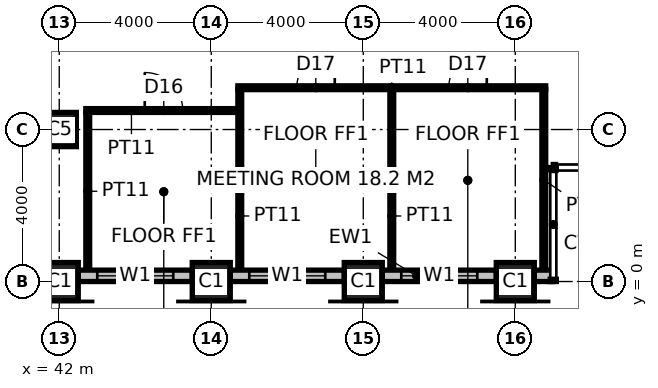
"""IFC4 building model, lengths in metres.
Left out: names, types, materials, properties, quantities, classifications, styles, units other than length and angle.
Written with IfcOpenShell. Run it as: python <this file> out.ifc"""

import sys

from ifc_helpers import new_model, si_unit, direction, frame, frame_2d, origin, origin_2d, place, context, subcontext, project, spatial, rectangle, hollow_rectangle, extrude, element, fill, save


model = new_model("IFC4")
c1 = context("Model", 3, precision=1e-05, world=origin(), true_north=direction((0.0, 1.0)))
c2 = subcontext(c1, "Body", "Model", "MODEL_VIEW")
j1 = project(units=[si_unit("LENGTHUNIT", "METRE"), si_unit("PLANEANGLEUNIT", "RADIAN")], contexts=[c1])
p1 = place(None, origin())
s1 = spatial("IfcSite", under=j1, at=p1, CompositionType="ELEMENT")
p2 = place(p1, origin())
s2 = spatial("IfcBuilding", under=s1, at=p2, CompositionType="ELEMENT")
p3 = place(p2, frame((0.0, 0.0, 93.4)))
s3 = spatial("IfcBuildingStorey", under=s2, at=p3, CompositionType="ELEMENT", Elevation=93.4)
for number, where, z_axis, x_axis in (
    (1, (42.0, 0.0, 0.0), (0.0, 0.0, 1.0), (1.0, 0.0, 0.0)),
    (2, (46.0, 0.0, 0.0), (0.0, 0.0, 1.0), (1.0, 0.0, 0.0)),
    (3, (50.0, 0.0, 0.0), (0.0, 0.0, 1.0), (1.0, 0.0, 0.0)),
    (4, (54.0, 0.0, 0.0), (0.0, 0.0, 1.0), (1.0, 0.0, 0.0)),
):
    element("IfcColumn", number, at=place(p3, frame(where, z_axis=z_axis, x_axis=x_axis)), inside=s3, PredefinedType="COLUMN", context=c2, shape_type="SweptSolid", body=[
        extrude(hollow_rectangle(XDim=1.0, YDim=1.0, WallThickness=0.1, at=origin_2d()), origin(), (0.0, 0.0, 1.0), 4.0),
    ])
p4 = place(p3, frame((42.0, 4.0, 0.0), z_axis=(0.0, 0.0, 1.0), x_axis=(1.0, 0.0, 0.0)))
e5 = element("IfcColumn", 5, at=p4, inside=s3, PredefinedType="COLUMN", context=c2, shape_type="SweptSolid", body=[
    extrude(hollow_rectangle(XDim=0.9, YDim=0.9, WallThickness=0.1, at=origin_2d()), origin(), (0.0, 0.0, 1.0), 4.0),
])
p5 = place(p3, frame((42.7, 4.5, 0.0), z_axis=(0.0, 0.0, 1.0), x_axis=(1.0, 0.0, 0.0)))
e6 = element("IfcWall", 6, at=p5, inside=s3, PredefinedType="PARTITIONING", context=c2, shape_type="SweptSolid", body=[
    extrude(rectangle(XDim=4.0, YDim=0.1, at=frame_2d((2.0, 0.0))), origin(), (0.0, 0.0, 1.0), 3.85),
])
p6 = place(p5, frame((1.55, 0.0, 0.0)))
e7 = element("IfcOpeningElement", 7, at=p6, cuts=e6, PredefinedType="OPENING", context=c2, shape_type="SweptSolid", body=[
    extrude(rectangle(XDim=1.0, YDim=2.2, at=frame_2d((0.5, 1.1))), frame((0.0, 0.06, 0.0), z_axis=(0.0, -1.0, 0.0), x_axis=(1.0, 0.0, 0.0)), (0.0, 0.0, 1.0), 0.12),
])
p7 = place(p3, frame((46.7, 5.1, 0.0), z_axis=(0.0, 0.0, 1.0), x_axis=(1.0, 0.0, 0.0)))
e8 = element("IfcWall", 8, at=p7, inside=s3, PredefinedType="PARTITIONING", context=c2, shape_type="SweptSolid", body=[
    extrude(rectangle(XDim=8.1, YDim=0.1, at=frame_2d((4.05, 0.0))), origin(), (0.0, 0.0, 1.0), 3.85),
])
p8 = place(p7, frame((1.55, 0.0, 0.0)))
e9 = element("IfcOpeningElement", 9, at=p8, cuts=e8, PredefinedType="OPENING", context=c2, shape_type="SweptSolid", body=[
    extrude(rectangle(XDim=1.0, YDim=2.2, at=frame_2d((0.5, 1.1))), frame((0.0, 0.06, 0.0), z_axis=(0.0, -1.0, 0.0), x_axis=(1.0, 0.0, 0.0)), (0.0, 0.0, 1.0), 0.12),
])
p9 = place(p7, frame((5.55, 0.0, 0.0)))
e10 = element("IfcOpeningElement", 10, at=p9, cuts=e8, PredefinedType="OPENING", context=c2, shape_type="SweptSolid", body=[
    extrude(rectangle(XDim=1.0, YDim=2.2, at=frame_2d((0.5, 1.1))), frame((0.0, 0.06, 0.0), z_axis=(0.0, -1.0, 0.0), x_axis=(1.0, 0.0, 0.0)), (0.0, 0.0, 1.0), 0.12),
])
p10 = place(p3, frame((42.75, 0.3, 0.0), z_axis=(0.0, 0.0, 1.0), x_axis=(0.0, 1.0, 0.0)))
e11 = element("IfcWall", 11, at=p10, inside=s3, PredefinedType="PARTITIONING", context=c2, shape_type="SweptSolid", body=[
    extrude(rectangle(XDim=4.15, YDim=0.1, at=frame_2d((2.075, 0.0))), origin(), (0.0, 0.0, 1.0), 3.85),
])
for number, where, z_axis, x_axis in (
    (12, (46.75, 0.3, 0.0), (0.0, 0.0, 1.0), (0.0, 1.0, 0.0)),
    (13, (50.75, 0.3, 0.0), (0.0, 0.0, 1.0), (0.0, 1.0, 0.0)),
    (14, (54.75, 0.3, 0.0), (0.0, 0.0, 1.0), (0.0, 1.0, 0.0)),
):
    element("IfcWall", number, at=place(p3, frame(where, z_axis=z_axis, x_axis=x_axis)), inside=s3, PredefinedType="PARTITIONING", context=c2, shape_type="SweptSolid", body=[
        extrude(rectangle(XDim=4.75, YDim=0.1, at=frame_2d((2.375, 0.0))), origin(), (0.0, 0.0, 1.0), 3.85),
    ])
p11 = place(p3, frame((42.5, 0.15, 0.0), z_axis=(0.0, 0.0, 1.0), x_axis=(1.0, 0.0, 0.0)))
e15 = element("IfcWall", 15, at=p11, inside=s3, PredefinedType="ELEMENTEDWALL", context=c2, shape_type="SweptSolid", body=[
    extrude(rectangle(XDim=3.0, YDim=0.3, at=frame_2d((1.5, 0.0))), origin(), (0.0, 0.0, 1.0), 2.85),
])
p12 = place(p11, frame((0.5, 0.0, 0.8)))
e16 = element("IfcOpeningElement", 16, at=p12, cuts=e15, PredefinedType="OPENING", context=c2, shape_type="SweptSolid", body=[
    extrude(rectangle(XDim=2.0, YDim=2.0, at=frame_2d((1.0, 1.0))), frame((0.0, 0.16, 0.0), z_axis=(0.0, -1.0, 0.0), x_axis=(1.0, 0.0, 0.0)), (0.0, 0.0, 1.0), 0.32),
])
p13 = place(p3, frame((46.5, 0.15, 0.0), z_axis=(0.0, 0.0, 1.0), x_axis=(1.0, 0.0, 0.0)))
e17 = element("IfcWall", 17, at=p13, inside=s3, PredefinedType="ELEMENTEDWALL", context=c2, shape_type="SweptSolid", body=[
    extrude(rectangle(XDim=3.0, YDim=0.3, at=frame_2d((1.5, 0.0))), origin(), (0.0, 0.0, 1.0), 2.85),
])
p14 = place(p13, frame((0.5, 0.0, 0.8)))
e18 = element("IfcOpeningElement", 18, at=p14, cuts=e17, PredefinedType="OPENING", context=c2, shape_type="SweptSolid", body=[
    extrude(rectangle(XDim=2.0, YDim=2.0, at=frame_2d((1.0, 1.0))), frame((0.0, 0.16, 0.0), z_axis=(0.0, -1.0, 0.0), x_axis=(1.0, 0.0, 0.0)), (0.0, 0.0, 1.0), 0.32),
])
p15 = place(p3, frame((50.5, 0.15, 0.0), z_axis=(0.0, 0.0, 1.0), x_axis=(1.0, 0.0, 0.0)))
e19 = element("IfcWall", 19, at=p15, inside=s3, PredefinedType="ELEMENTEDWALL", context=c2, shape_type="SweptSolid", body=[
    extrude(rectangle(XDim=3.0, YDim=0.3, at=frame_2d((1.5, 0.0))), origin(), (0.0, 0.0, 1.0), 2.85),
])
p16 = place(p15, frame((0.5, 0.0, 0.8)))
e20 = element("IfcOpeningElement", 20, at=p16, cuts=e19, PredefinedType="OPENING", context=c2, shape_type="SweptSolid", body=[
    extrude(rectangle(XDim=2.0, YDim=2.0, at=frame_2d((1.0, 1.0))), frame((0.0, 0.16, 0.0), z_axis=(0.0, -1.0, 0.0), x_axis=(1.0, 0.0, 0.0)), (0.0, 0.0, 1.0), 0.32),
])
p17 = place(p3, frame((54.5, 0.15, 0.0), z_axis=(0.0, 0.0, 1.0), x_axis=(1.0, 0.0, 0.0)))
e21 = element("IfcWall", 21, at=p17, inside=s3, PredefinedType="ELEMENTEDWALL", context=c2, shape_type="SweptSolid", body=[
    extrude(rectangle(XDim=0.47, YDim=0.3, at=frame_2d((0.235, 0.0))), origin(), (0.0, 0.0, 1.0), 2.95),
])
p18 = place(p6, origin())
e22 = element("IfcDoor", 22, at=p18, inside=s3, OperationType="SINGLE_SWING_LEFT", PredefinedType="DOOR", context=c2, shape_type="SweptSolid", body=[
    extrude(rectangle(XDim=1.0, YDim=2.2, at=frame_2d((0.5, 1.1))), frame((0.0, 0.025, 0.0), z_axis=(0.0, -1.0, 0.0), x_axis=(1.0, 0.0, 0.0)), (0.0, 0.0, 1.0), 0.05),
])
fill(e7, e22)
p19 = place(p8, origin())
e23 = element("IfcDoor", 23, at=p19, inside=s3, OperationType="SINGLE_SWING_RIGHT", PredefinedType="DOOR", context=c2, shape_type="SweptSolid", body=[
    extrude(rectangle(XDim=1.0, YDim=2.2, at=frame_2d((0.5, 1.1))), frame((0.0, 0.025, 0.0), z_axis=(0.0, -1.0, 0.0), x_axis=(1.0, 0.0, 0.0)), (0.0, 0.0, 1.0), 0.05),
])
fill(e9, e23)
p20 = place(p9, origin())
e24 = element("IfcDoor", 24, at=p20, inside=s3, OperationType="SINGLE_SWING_RIGHT", PredefinedType="DOOR", context=c2, shape_type="SweptSolid", body=[
    extrude(rectangle(XDim=1.0, YDim=2.2, at=frame_2d((0.5, 1.1))), frame((0.0, 0.025, 0.0), z_axis=(0.0, -1.0, 0.0), x_axis=(1.0, 0.0, 0.0)), (0.0, 0.0, 1.0), 0.05),
])
fill(e10, e24)
p21 = place(p12, origin())
e25 = element("IfcWindow", 25, at=p21, inside=s3, PartitioningType="SINGLE_PANEL", PredefinedType="WINDOW", context=c2, shape_type="SweptSolid", body=[
    extrude(rectangle(XDim=2.0, YDim=2.0, at=frame_2d((1.0, 1.0))), frame((0.0, 0.03, 0.0), z_axis=(0.0, -1.0, 0.0), x_axis=(1.0, 0.0, 0.0)), (0.0, 0.0, 1.0), 0.06),
])
fill(e16, e25)
p22 = place(p14, origin())
e26 = element("IfcWindow", 26, at=p22, inside=s3, PartitioningType="SINGLE_PANEL", PredefinedType="WINDOW", context=c2, shape_type="SweptSolid", body=[
    extrude(rectangle(XDim=2.0, YDim=2.0, at=frame_2d((1.0, 1.0))), frame((0.0, 0.03, 0.0), z_axis=(0.0, -1.0, 0.0), x_axis=(1.0, 0.0, 0.0)), (0.0, 0.0, 1.0), 0.06),
])
fill(e18, e26)
p23 = place(p16, origin())
e27 = element("IfcWindow", 27, at=p23, inside=s3, PartitioningType="SINGLE_PANEL", PredefinedType="WINDOW", context=c2, shape_type="SweptSolid", body=[
    extrude(rectangle(XDim=2.0, YDim=2.0, at=frame_2d((1.0, 1.0))), frame((0.0, 0.03, 0.0), z_axis=(0.0, -1.0, 0.0), x_axis=(1.0, 0.0, 0.0)), (0.0, 0.0, 1.0), 0.06),
])
fill(e20, e27)
save(model, sys.argv[1])
